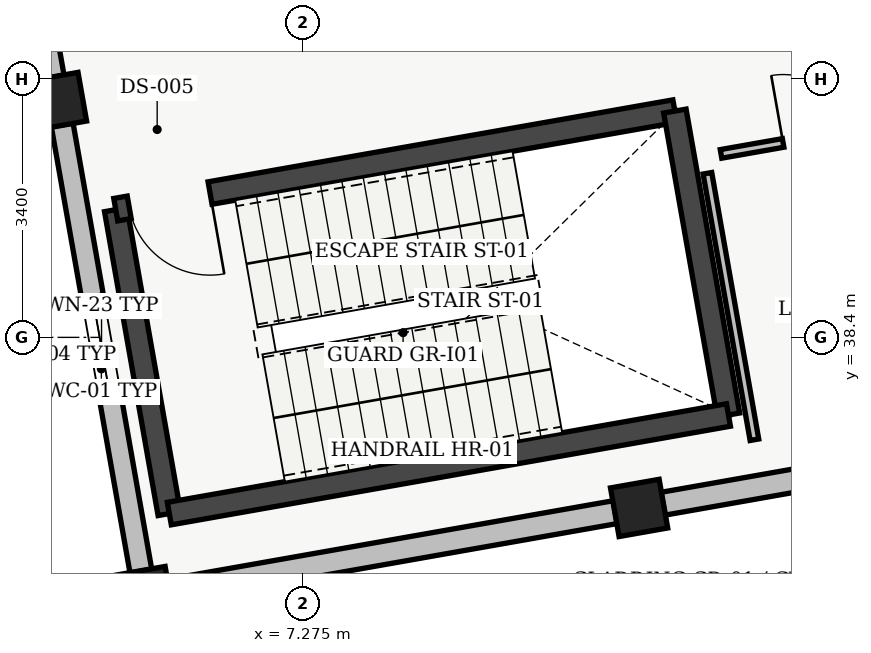
"""IFC4 building model, lengths in metres.
Left out: names, types, materials, properties, quantities, classifications, styles, units other than length and angle.
Written with IfcOpenShell. Run it as: python <this file> out.ifc"""

import sys

from ifc_helpers import new_model, si_unit, direction, frame, frame_2d, origin, origin_2d, place, context, subcontext, project, spatial, rectangle, extrude, element, fill, save


model = new_model("IFC4")
c1 = context("Model", 3, precision=1e-05, world=origin(), true_north=direction((0.0, 1.0)))
c2 = subcontext(c1, "Body", "Model", "MODEL_VIEW")
j1 = project(units=[si_unit("LENGTHUNIT", "METRE"), si_unit("PLANEANGLEUNIT", "RADIAN")], contexts=[c1])
p1 = place(None, origin())
s1 = spatial("IfcSite", under=j1, at=p1, CompositionType="ELEMENT")
p2 = place(p1, origin())
s2 = spatial("IfcBuilding", under=s1, at=p2, CompositionType="ELEMENT")
p3 = place(p2, frame((0.0, 0.0, 14.1)))
s3 = spatial("IfcBuildingStorey", under=s2, at=p3, CompositionType="ELEMENT", Elevation=14.1)
for number, where, z_axis, x_axis in (
    (1, (5.2, 35.01, 0.0), (0.0, 0.0, 1.0), (0.985, 0.174, 0.0)),
    (2, (4.054, 41.51, 0.0), (0.0, 0.0, 1.0), (0.985, 0.174, 0.0)),
    (3, (11.7, 36.156, 0.0), (0.0, 0.0, 1.0), (0.985, 0.174, 0.0)),
):
    element("IfcColumn", number, at=place(p3, frame(where, z_axis=z_axis, x_axis=x_axis)), inside=s3, PredefinedType="COLUMN", context=c2, shape_type="SweptSolid", body=[
        extrude(rectangle(XDim=0.65, YDim=0.65, at=origin_2d()), origin(), (0.0, 0.0, 1.0), 4.31),
    ])
p4 = place(p3, frame((5.145, 35.325, 0.0), z_axis=(0.0, 0.0, 1.0), x_axis=(-0.17368484894, 0.984801286173, 0.0)))
e4 = element("IfcWall", 4, at=p4, inside=s3, PredefinedType="STANDARD", context=c2, shape_type="SweptSolid", body=[
    extrude(rectangle(XDim=5.96, YDim=0.29, at=frame_2d((2.98, 0.0))), origin(), (0.0, 0.0, 1.0), 3.795),
])
p5 = place(p4, frame((2.295, 0.0, 0.95)))
e5 = element("IfcOpeningElement", 5, at=p5, cuts=e4, PredefinedType="OPENING", context=c2, shape_type="SweptSolid", body=[
    extrude(rectangle(XDim=1.37, YDim=1.42, at=frame_2d((0.685, 0.71))), frame((0.0, 0.145, 0.0), z_axis=(0.0, -1.0, 0.0), x_axis=(1.0, 0.0, 0.0)), (0.0, 0.0, 1.0), 0.29),
])
p6 = place(p3, frame((3.998, 41.825, 0.0), z_axis=(0.0, 0.0, 1.0), x_axis=(-0.173645120828, 0.98480829201, 0.0)))
e6 = element("IfcWall", 6, at=p6, inside=s3, PredefinedType="STANDARD", context=c2, shape_type="SweptSolid", body=[
    extrude(rectangle(XDim=5.96, YDim=0.275, at=frame_2d((2.98, 0.0))), origin(), (0.0, 0.0, 1.0), 3.795),
])
p7 = place(p6, frame((2.25, 0.0, 0.95)))
e7 = element("IfcOpeningElement", 7, at=p7, cuts=e6, PredefinedType="OPENING", context=c2, shape_type="SweptSolid", body=[
    extrude(rectangle(XDim=1.46, YDim=1.44, at=frame_2d((0.73, 0.72))), frame((0.0, 0.137, 0.0), z_axis=(0.0, -1.0, 0.0), x_axis=(1.0, 0.0, 0.0)), (0.0, 0.0, 1.0), 0.275),
])
p8 = place(p3, frame((17.884, 37.247, 0.0), z_axis=(0.0, 0.0, 1.0), x_axis=(-0.98480829201, -0.173645120828, 0.0)))
e8 = element("IfcWall", 8, at=p8, inside=s3, PredefinedType="STANDARD", context=c2, shape_type="SweptSolid", body=[
    extrude(rectangle(XDim=5.96, YDim=0.305, at=frame_2d((2.98, 0.0))), origin(), (0.0, 0.0, 1.0), 3.795),
])
p9 = place(p8, frame((2.205, 0.0, 0.95)))
e9 = element("IfcOpeningElement", 9, at=p9, cuts=e8, PredefinedType="OPENING", context=c2, shape_type="SweptSolid", body=[
    extrude(rectangle(XDim=1.55, YDim=1.46, at=frame_2d((0.775, 0.73))), frame((0.0, 0.152, 0.0), z_axis=(0.0, -1.0, 0.0), x_axis=(1.0, 0.0, 0.0)), (0.0, 0.0, 1.0), 0.305),
])
p10 = place(p3, frame((11.385, 36.101, 0.0), z_axis=(0.0, 0.0, 1.0), x_axis=(-0.98480829201, -0.173645120828, 0.0)))
e10 = element("IfcWall", 10, at=p10, inside=s3, PredefinedType="STANDARD", context=c2, shape_type="SweptSolid", body=[
    extrude(rectangle(XDim=5.96, YDim=0.305, at=frame_2d((2.98, 0.0))), origin(), (0.0, 0.0, 1.0), 3.795),
])
p11 = place(p3, frame((5.519, 36.082, 0.0), z_axis=(0.0, 0.0, 1.0), x_axis=(-0.173665267602, 0.984804739443, 0.0)))
e11 = element("IfcWall", 11, at=p11, inside=s3, PredefinedType="SHEAR", context=c2, shape_type="SweptSolid", body=[
    extrude(rectangle(XDim=4.06, YDim=0.3, at=frame_2d((2.03, 0.0))), origin(), (0.0, 0.0, 1.0), 4.28),
])
p12 = place(p3, frame((4.814, 40.08, 0.0), z_axis=(0.0, 0.0, 1.0), x_axis=(0.984802636214, 0.173677193974, 0.0)))
e12 = element("IfcWall", 12, at=p12, inside=s3, PredefinedType="SHEAR", context=c2, shape_type="SweptSolid", body=[
    extrude(rectangle(XDim=7.47, YDim=0.3, at=frame_2d((3.735, 0.0))), origin(), (0.0, 0.0, 1.0), 4.28),
])
p13 = place(p12, frame((0.18, 0.0, 0.0)))
e13 = element("IfcOpeningElement", 13, at=p13, cuts=e12, PredefinedType="OPENING", context=c2, shape_type="SweptSolid", body=[
    extrude(rectangle(XDim=1.08, YDim=2.15, at=frame_2d((0.54, 1.075))), frame((0.0, 0.15, 0.0), z_axis=(0.0, -1.0, 0.0), x_axis=(1.0, 0.0, 0.0)), (0.0, 0.0, 1.0), 0.3),
])
p14 = place(p3, frame((12.17, 41.377, 0.0), z_axis=(0.0, 0.0, 1.0), x_axis=(0.173654983803, -0.984806552883, 0.0)))
e14 = element("IfcWall", 14, at=p14, inside=s3, PredefinedType="SHEAR", context=c2, shape_type="SweptSolid", body=[
    extrude(rectangle(XDim=4.06, YDim=0.3, at=frame_2d((2.03, 0.0))), origin(), (0.0, 0.0, 1.0), 4.28),
])
p15 = place(p3, frame((12.875, 37.379, 0.0), z_axis=(0.0, 0.0, 1.0), x_axis=(-0.984808225754, -0.173645496596, 0.0)))
e15 = element("IfcWall", 15, at=p15, inside=s3, PredefinedType="SHEAR", context=c2, shape_type="SweptSolid", body=[
    extrude(rectangle(XDim=7.47, YDim=0.3, at=frame_2d((3.735, 0.0))), origin(), (0.0, 0.0, 1.0), 4.28),
])
p16 = place(p3, frame((15.298, 41.259, 0.0), z_axis=(0.0, 0.0, 1.0), x_axis=(-0.984803714572, -0.17367107924, 0.0)))
e16 = element("IfcWall", 16, at=p16, inside=s3, PredefinedType="PARTITIONING", context=c2, shape_type="SweptSolid", body=[
    extrude(rectangle(XDim=2.56, YDim=0.115, at=frame_2d((1.28, 0.0))), origin(), (0.0, 0.0, 1.0), 3.95),
])
p17 = place(p16, frame((0.83, 0.0, 0.0)))
e17 = element("IfcOpeningElement", 17, at=p17, cuts=e16, PredefinedType="OPENING", context=c2, shape_type="SweptSolid", body=[
    extrude(rectangle(XDim=0.9, YDim=2.1, at=frame_2d((0.45, 1.05))), frame((0.0, 0.058, 0.0), z_axis=(0.0, -1.0, 0.0), x_axis=(1.0, 0.0, 0.0)), (0.0, 0.0, 1.0), 0.115),
])
p18 = place(p3, frame((12.599, 40.559, 0.0), z_axis=(0.0, 0.0, 1.0), x_axis=(0.173644490041, -0.984808403233, 0.0)))
e18 = element("IfcWall", 18, at=p18, inside=s3, PredefinedType="PARTITIONING", context=c2, shape_type="SweptSolid", body=[
    extrude(rectangle(XDim=3.56, YDim=0.115, at=frame_2d((1.78, 0.0))), origin(), (0.0, 0.0, 1.0), 3.95),
])
p19 = place(p5, origin())
e19 = element("IfcWindow", 19, at=p19, inside=s3, PartitioningType="SINGLE_PANEL", PredefinedType="WINDOW", context=c2, shape_type="SweptSolid", body=[
    extrude(rectangle(XDim=1.37, YDim=1.42, at=frame_2d((0.685, 0.71))), frame((0.0, 0.03, 0.0), z_axis=(0.0, -1.0, 0.0), x_axis=(1.0, 0.0, 0.0)), (0.0, 0.0, 1.0), 0.06),
])
fill(e5, e19)
p20 = place(p13, origin())
e20 = element("IfcDoor", 20, at=p20, inside=s3, OperationType="SINGLE_SWING_RIGHT", PredefinedType="DOOR", context=c2, shape_type="SweptSolid", body=[
    extrude(rectangle(XDim=1.08, YDim=2.15, at=frame_2d((0.54, 1.075))), frame((0.0, 0.025, 0.0), z_axis=(0.0, -1.0, 0.0), x_axis=(1.0, 0.0, 0.0)), (0.0, 0.0, 1.0), 0.05),
])
fill(e13, e20)
p21 = place(p17, origin())
e21 = element("IfcDoor", 21, at=p21, inside=s3, OperationType="SINGLE_SWING_RIGHT", PredefinedType="DOOR", context=c2, shape_type="SweptSolid", body=[
    extrude(rectangle(XDim=0.9, YDim=2.1, at=frame_2d((0.45, 1.05))), frame((0.0, 0.025, 0.0), z_axis=(0.0, -1.0, 0.0), x_axis=(1.0, 0.0, 0.0)), (0.0, 0.0, 1.0), 0.05),
])
fill(e17, e21)
save(model, sys.argv[1])
